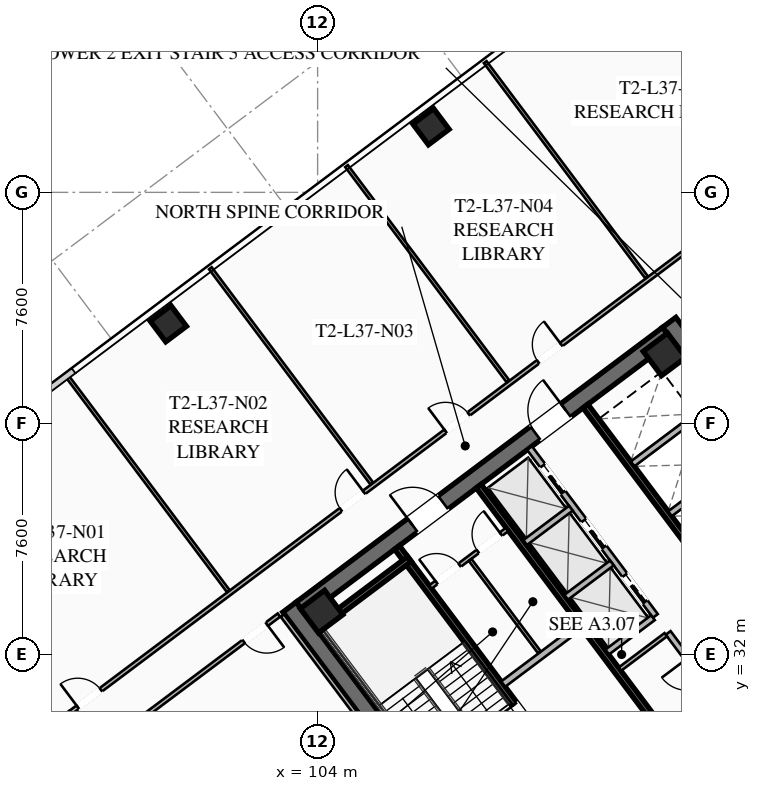
"""IFC4 building model, lengths in metres.
Left out: names, types, materials, properties, quantities, classifications, styles, units other than length and angle.
Written with IfcOpenShell. Run it as: python <this file> out.ifc"""

import sys

from ifc_helpers import new_model, si_unit, direction, frame, frame_2d, origin, origin_2d, place, context, subcontext, project, spatial, rectangle, hollow_rectangle, extrude, element, fill, save


model = new_model("IFC4")
c1 = context("Model", 3, precision=1e-05, world=origin(), true_north=direction((0.0, 1.0)))
c2 = subcontext(c1, "Body", "Model", "MODEL_VIEW")
j1 = project(units=[si_unit("LENGTHUNIT", "METRE"), si_unit("PLANEANGLEUNIT", "RADIAN")], contexts=[c1])
p1 = place(None, origin())
s1 = spatial("IfcSite", under=j1, at=p1, CompositionType="ELEMENT")
p2 = place(p1, origin())
s2 = spatial("IfcBuilding", under=s1, at=p2, CompositionType="ELEMENT")
p3 = place(p2, frame((0.0, 0.0, 139.25)))
s3 = spatial("IfcBuildingStorey", under=s2, at=p3, CompositionType="ELEMENT", Elevation=139.25)
for number, where, z_axis, x_axis in (
    (1, (112.436, 21.077, 0.0), (0.0, 0.0, 1.0), (-0.6, 0.8, 0.0)),
    (2, (115.564, 42.923, 0.0), (0.0, 0.0, 1.0), (0.6, -0.8, 0.0)),
):
    element("IfcWall", number, at=place(p3, frame(where, z_axis=z_axis, x_axis=x_axis)), inside=s3, PredefinedType="SHEAR", context=c2, shape_type="SweptSolid", body=[
        extrude(rectangle(XDim=15.6, YDim=0.55, at=frame_2d((7.8, 0.0))), origin(), (0.0, 0.0, 1.0), 3.55),
    ])
p4 = place(p3, frame((124.539, 30.498, 0.0), z_axis=(0.0, 0.0, 1.0), x_axis=(-0.799998054672, -0.600002593761, 0.0)))
e3 = element("IfcWall", 3, at=p4, inside=s3, PredefinedType="SHEAR", context=c2, shape_type="SweptSolid", body=[
    extrude(rectangle(XDim=15.06, YDim=0.55, at=frame_2d((7.53, 0.0))), origin(), (0.0, 0.0, 1.0), 3.55),
])
p5 = place(p4, frame((9.23, 0.0, 0.0)))
e4 = element("IfcOpeningElement", 4, at=p5, cuts=e3, PredefinedType="OPENING", context=c2, shape_type="SweptSolid", body=[
    extrude(rectangle(XDim=1.25, YDim=2.25, at=frame_2d((0.625, 1.125))), frame((0.0, 0.285, 0.0), z_axis=(0.0, -1.0, 0.0), x_axis=(1.0, 0.0, 0.0)), (0.0, 0.0, 1.0), 0.57),
])
p6 = place(p4, frame((4.18, 0.0, 0.0)))
e5 = element("IfcOpeningElement", 5, at=p6, cuts=e3, PredefinedType="OPENING", context=c2, shape_type="SweptSolid", body=[
    extrude(rectangle(XDim=1.25, YDim=2.25, at=frame_2d((0.625, 1.125))), frame((0.0, 0.285, 0.0), z_axis=(0.0, -1.0, 0.0), x_axis=(1.0, 0.0, 0.0)), (0.0, 0.0, 1.0), 0.57),
])
p7 = place(p3, frame((103.461, 33.502, 0.0), z_axis=(0.0, 0.0, 1.0), x_axis=(0.799998054672, 0.600002593761, 0.0)))
e6 = element("IfcWall", 6, at=p7, inside=s3, PredefinedType="SHEAR", context=c2, shape_type="SweptSolid", body=[
    extrude(rectangle(XDim=15.06, YDim=0.55, at=frame_2d((7.53, 0.0))), origin(), (0.0, 0.0, 1.0), 3.55),
])
p8 = place(p7, frame((4.58, 0.0, 0.0)))
e7 = element("IfcOpeningElement", 7, at=p8, cuts=e6, PredefinedType="OPENING", context=c2, shape_type="SweptSolid", body=[
    extrude(rectangle(XDim=1.25, YDim=2.25, at=frame_2d((0.625, 1.125))), frame((0.0, 0.285, 0.0), z_axis=(0.0, -1.0, 0.0), x_axis=(1.0, 0.0, 0.0)), (0.0, 0.0, 1.0), 0.57),
])
p9 = place(p7, frame((9.63, 0.0, 0.0)))
e8 = element("IfcOpeningElement", 8, at=p9, cuts=e6, PredefinedType="OPENING", context=c2, shape_type="SweptSolid", body=[
    extrude(rectangle(XDim=1.25, YDim=2.25, at=frame_2d((0.625, 1.125))), frame((0.0, 0.285, 0.0), z_axis=(0.0, -1.0, 0.0), x_axis=(1.0, 0.0, 0.0)), (0.0, 0.0, 1.0), 0.57),
])
for number, where, z_axis, x_axis in (
    (9, (115.41, 41.87, 0.0), (0.0, 0.0, 1.0), (0.8, 0.6, 0.0)),
    (10, (104.13, 33.41, 0.0), (0.0, 0.0, 1.0), (0.8, 0.6, 0.0)),
):
    element("IfcColumn", number, at=place(p3, frame(where, z_axis=z_axis, x_axis=x_axis)), inside=s3, PredefinedType="COLUMN", context=c2, shape_type="SweptSolid", body=[
        extrude(hollow_rectangle(XDim=1.0, YDim=1.0, WallThickness=0.04, at=origin_2d()), origin(), (0.0, 0.0, 1.0), 3.37),
    ])
for number, where, z_axis, x_axis in (
    (11, (107.73, 49.36, 0.0), (0.0, 0.0, 1.0), (0.8, 0.6, 0.0)),
    (12, (99.09, 42.88, 0.0), (0.0, 0.0, 1.0), (0.8, 0.6, 0.0)),
):
    element("IfcColumn", number, at=place(p3, frame(where, z_axis=z_axis, x_axis=x_axis)), inside=s3, PredefinedType="COLUMN", context=c2, shape_type="SweptSolid", body=[
        extrude(hollow_rectangle(XDim=0.85, YDim=0.85, WallThickness=0.035, at=origin_2d()), origin(), (0.0, 0.0, 1.0), 3.37),
    ])
p10 = place(p3, frame((111.44, 29.08, 0.0), z_axis=(0.0, 0.0, 1.0), x_axis=(-0.59999029481, 0.8000072788, 0.0)))
e13 = element("IfcWall", 13, at=p10, inside=s3, PredefinedType="SHEAR", context=c2, shape_type="SweptSolid", body=[
    extrude(rectangle(XDim=8.05, YDim=0.2, at=frame_2d((4.025, 0.0))), origin(), (0.0, 0.0, 1.0), 3.37),
])
p11 = place(p10, frame((0.45, 0.0, 0.0)))
e14 = element("IfcOpeningElement", 14, at=p11, cuts=e13, PredefinedType="OPENING", context=c2, shape_type="SweptSolid", body=[
    extrude(rectangle(XDim=1.15, YDim=2.2, at=frame_2d((0.575, 1.1))), frame((0.0, 0.11, 0.0), z_axis=(0.0, -1.0, 0.0), x_axis=(1.0, 0.0, 0.0)), (0.0, 0.0, 1.0), 0.22),
])
p12 = place(p3, frame((103.956, 32.842, 0.0), z_axis=(0.0, 0.0, 1.0), x_axis=(0.800015298837, 0.599979601008, 0.0)))
e15 = element("IfcWall", 15, at=p12, inside=s3, PredefinedType="SHEAR", context=c2, shape_type="SweptSolid", body=[
    extrude(rectangle(XDim=3.83, YDim=0.2, at=frame_2d((1.915, 0.0))), origin(), (0.0, 0.0, 1.0), 3.37),
])
p13 = place(p3, frame((117.998, 25.936, 0.0), z_axis=(0.0, 0.0, 1.0), x_axis=(-0.600002693989, 0.799997979501, 0.0)))
e16 = element("IfcWall", 16, at=p13, inside=s3, PredefinedType="SHEAR", context=c2, shape_type="SweptSolid", body=[
    extrude(rectangle(XDim=14.5, YDim=0.2, at=frame_2d((7.25, 0.0))), origin(), (0.0, 0.0, 1.0), 3.37),
])
p14 = place(p3, frame((110.104, 31.028, 0.0), z_axis=(0.0, 0.0, 1.0), x_axis=(0.800018601094, 0.59997519774, 0.0)))
e17 = element("IfcWall", 17, at=p14, inside=s3, PredefinedType="SOLIDWALL", context=c2, shape_type="SweptSolid", body=[
    extrude(rectangle(XDim=3.15, YDim=0.22, at=frame_2d((1.575, 0.0))), origin(), (0.0, 0.0, 1.0), 2.723),
])
p15 = place(p3, frame((112.81, 40.17, 0.0), z_axis=(0.0, 0.0, 1.0), x_axis=(0.599993943644, -0.800004542231, 0.0)))
e18 = element("IfcWall", 18, at=p15, inside=s3, PredefinedType="SHEAR", context=c2, shape_type="SweptSolid", body=[
    extrude(rectangle(XDim=6.45, YDim=0.2, at=frame_2d((3.225, 0.0))), origin(), (0.0, 0.0, 1.0), 3.37),
])
for number, where, z_axis, x_axis in (
    (19, (115.59, 36.63, 0.0), (0.0, 0.0, 1.0), (0.8, 0.6, 0.0)),
    (20, (114.36, 38.27, 0.0), (0.0, 0.0, 1.0), (0.8, 0.6, 0.0)),
):
    element("IfcWall", number, at=place(p3, frame(where, z_axis=z_axis, x_axis=x_axis)), inside=s3, PredefinedType="SOLIDWALL", context=c2, shape_type="SweptSolid", body=[
        extrude(rectangle(XDim=3.48, YDim=0.2, at=frame_2d((1.74, 0.0))), origin(), (0.0, 0.0, 1.0), 3.37),
    ])
p16 = place(p3, frame((107.71, 34.22, 0.0), z_axis=(0.0, 0.0, 1.0), x_axis=(0.799981399002, 0.60002480053, 0.0)))
e21 = element("IfcWall", 21, at=p16, inside=s3, PredefinedType="PARTITIONING", context=c2, shape_type="SweptSolid", body=[
    extrude(rectangle(XDim=3.15, YDim=0.135, at=frame_2d((1.575, 0.0))), origin(), (0.0, 0.0, 1.0), 2.723),
])
p17 = place(p16, frame((0.25, 0.0, 0.0)))
e22 = element("IfcOpeningElement", 22, at=p17, cuts=e21, PredefinedType="OPENING", context=c2, shape_type="SweptSolid", body=[
    extrude(rectangle(XDim=0.95, YDim=2.05, at=frame_2d((0.475, 1.025))), frame((0.0, 0.077, 0.0), z_axis=(0.0, -1.0, 0.0), x_axis=(1.0, 0.0, 0.0)), (0.0, 0.0, 1.0), 0.155),
])
p18 = place(p16, frame((1.95, 0.0, 0.0)))
e23 = element("IfcOpeningElement", 23, at=p18, cuts=e21, PredefinedType="OPENING", context=c2, shape_type="SweptSolid", body=[
    extrude(rectangle(XDim=0.95, YDim=2.05, at=frame_2d((0.475, 1.025))), frame((0.0, 0.077, 0.0), z_axis=(0.0, -1.0, 0.0), x_axis=(1.0, 0.0, 0.0)), (0.0, 0.0, 1.0), 0.155),
])
p19 = place(p3, frame((111.296, 32.072, 0.0), z_axis=(0.0, 0.0, 1.0), x_axis=(-0.59995887973, 0.800030838552, 0.0)))
e24 = element("IfcWall", 24, at=p19, inside=s3, PredefinedType="PARTITIONING", context=c2, shape_type="SweptSolid", body=[
    extrude(rectangle(XDim=3.8, YDim=0.11, at=frame_2d((1.9, 0.0))), origin(), (0.0, 0.0, 1.0), 2.723),
])
p20 = place(p3, frame((119.67, 27.19, 0.0), z_axis=(0.0, 0.0, 1.0), x_axis=(-0.599988677396, 0.800008491828, 0.0)))
e25 = element("IfcWall", 25, at=p20, inside=s3, PredefinedType="SOLIDWALL", context=c2, shape_type="SweptSolid", body=[
    extrude(rectangle(XDim=6.9, YDim=0.2, at=frame_2d((3.45, 0.0))), origin(), (0.0, 0.0, 1.0), 2.723),
])
p21 = place(p20, frame((0.85, 0.0, 0.0)))
e26 = element("IfcOpeningElement", 26, at=p21, cuts=e25, PredefinedType="OPENING", context=c2, shape_type="SweptSolid", body=[
    extrude(rectangle(XDim=0.95, YDim=2.05, at=frame_2d((0.475, 1.025))), frame((0.0, 0.11, 0.0), z_axis=(0.0, -1.0, 0.0), x_axis=(1.0, 0.0, 0.0)), (0.0, 0.0, 1.0), 0.22),
])
p22 = place(p20, frame((4.8, 0.0, 0.0)))
e27 = element("IfcOpeningElement", 27, at=p22, cuts=e25, PredefinedType="OPENING", context=c2, shape_type="SweptSolid", body=[
    extrude(rectangle(XDim=1.05, YDim=2.2, at=frame_2d((0.525, 1.1))), frame((0.0, 0.11, 0.0), z_axis=(0.0, -1.0, 0.0), x_axis=(1.0, 0.0, 0.0)), (0.0, 0.0, 1.0), 0.22),
])
p23 = place(p3, frame((113.946, 31.522, 0.0), z_axis=(0.0, 0.0, 1.0), x_axis=(0.8, 0.6, 0.0)))
e28 = element("IfcWall", 28, at=p23, inside=s3, PredefinedType="PARTITIONING", context=c2, shape_type="SweptSolid", body=[
    extrude(rectangle(XDim=1.88, YDim=0.135, at=frame_2d((0.94, 0.0))), origin(), (0.0, 0.0, 1.0), 2.723),
])
p24 = place(p3, frame((115.11, 33.27, 0.0), z_axis=(0.0, 0.0, 1.0), x_axis=(-0.600011322243, 0.799991508192, 0.0)))
e29 = element("IfcWall", 29, at=p24, inside=s3, PredefinedType="SOLIDWALL", context=c2, shape_type="SweptSolid", body=[
    extrude(rectangle(XDim=6.9, YDim=0.2, at=frame_2d((3.45, 0.0))), origin(), (0.0, 0.0, 1.0), 3.37),
])
p25 = place(p24, frame((0.575, 0.0, 0.0)))
e30 = element("IfcOpeningElement", 30, at=p25, cuts=e29, PredefinedType="OPENING", context=c2, shape_type="SweptSolid", body=[
    extrude(rectangle(XDim=1.1, YDim=2.2, at=frame_2d((0.55, 1.1))), frame((0.0, 0.11, 0.0), z_axis=(0.0, -1.0, 0.0), x_axis=(1.0, 0.0, 0.0)), (0.0, 0.0, 1.0), 0.22),
])
p26 = place(p24, frame((2.825, 0.0, 0.0)))
e31 = element("IfcOpeningElement", 31, at=p26, cuts=e29, PredefinedType="OPENING", context=c2, shape_type="SweptSolid", body=[
    extrude(rectangle(XDim=1.1, YDim=2.2, at=frame_2d((0.55, 1.1))), frame((0.0, 0.11, 0.0), z_axis=(0.0, -1.0, 0.0), x_axis=(1.0, 0.0, 0.0)), (0.0, 0.0, 1.0), 0.22),
])
p27 = place(p24, frame((5.075, 0.0, 0.0)))
e32 = element("IfcOpeningElement", 32, at=p27, cuts=e29, PredefinedType="OPENING", context=c2, shape_type="SweptSolid", body=[
    extrude(rectangle(XDim=1.1, YDim=2.2, at=frame_2d((0.55, 1.1))), frame((0.0, 0.11, 0.0), z_axis=(0.0, -1.0, 0.0), x_axis=(1.0, 0.0, 0.0)), (0.0, 0.0, 1.0), 0.22),
])
p28 = place(p3, frame((113.526, 32.082, 0.0), z_axis=(0.0, 0.0, 1.0), x_axis=(0.800046745961, 0.599937666993, 0.0)))
e33 = element("IfcWall", 33, at=p28, inside=s3, PredefinedType="SOLIDWALL", context=c2, shape_type="SweptSolid", body=[
    extrude(rectangle(XDim=1.88, YDim=0.2, at=frame_2d((0.94, 0.0))), origin(), (0.0, 0.0, 1.0), 3.37),
])
p29 = place(p3, frame((112.176, 33.882, 0.0), z_axis=(0.0, 0.0, 1.0), x_axis=(0.8, 0.6, 0.0)))
e34 = element("IfcWall", 34, at=p29, inside=s3, PredefinedType="SOLIDWALL", context=c2, shape_type="SweptSolid", body=[
    extrude(rectangle(XDim=1.88, YDim=0.2, at=frame_2d((0.94, 0.0))), origin(), (0.0, 0.0, 1.0), 3.37),
])
p30 = place(p3, frame((110.826, 35.682, 0.0), z_axis=(0.0, 0.0, 1.0), x_axis=(0.799984418148, 0.600020775241, 0.0)))
e35 = element("IfcWall", 35, at=p30, inside=s3, PredefinedType="SOLIDWALL", context=c2, shape_type="SweptSolid", body=[
    extrude(rectangle(XDim=1.88, YDim=0.2, at=frame_2d((0.94, 0.0))), origin(), (0.0, 0.0, 1.0), 3.37),
])
p31 = place(p3, frame((95.87, 30.09, 0.0), z_axis=(0.0, 0.0, 1.0), x_axis=(0.799997191971, 0.600003744021, 0.0)))
e36 = element("IfcWall", 36, at=p31, inside=s3, PredefinedType="PARTITIONING", context=c2, shape_type="SweptSolid", body=[
    extrude(rectangle(XDim=31.3, YDim=0.135, at=frame_2d((15.65, 0.0))), origin(), (0.0, 0.0, 1.0), 2.723),
])
p32 = place(p31, frame((0.3, 0.0, 0.0)))
e37 = element("IfcOpeningElement", 37, at=p32, cuts=e36, PredefinedType="OPENING", context=c2, shape_type="SweptSolid", body=[
    extrude(rectangle(XDim=0.95, YDim=2.05, at=frame_2d((0.475, 1.025))), frame((0.0, 0.077, 0.0), z_axis=(0.0, -1.0, 0.0), x_axis=(1.0, 0.0, 0.0)), (0.0, 0.0, 1.0), 0.155),
])
p33 = place(p31, frame((11.12, 0.0, 0.0)))
e38 = element("IfcOpeningElement", 38, at=p33, cuts=e36, PredefinedType="OPENING", context=c2, shape_type="SweptSolid", body=[
    extrude(rectangle(XDim=0.95, YDim=2.05, at=frame_2d((0.475, 1.025))), frame((0.0, 0.077, 0.0), z_axis=(0.0, -1.0, 0.0), x_axis=(1.0, 0.0, 0.0)), (0.0, 0.0, 1.0), 0.155),
])
p34 = place(p31, frame((15.423, 0.0, 0.0)))
e39 = element("IfcOpeningElement", 39, at=p34, cuts=e36, PredefinedType="OPENING", context=c2, shape_type="SweptSolid", body=[
    extrude(rectangle(XDim=0.95, YDim=2.05, at=frame_2d((0.475, 1.025))), frame((0.0, 0.077, 0.0), z_axis=(0.0, -1.0, 0.0), x_axis=(1.0, 0.0, 0.0)), (0.0, 0.0, 1.0), 0.155),
])
p35 = place(p31, frame((19.228, 0.0, 0.0)))
e40 = element("IfcOpeningElement", 40, at=p35, cuts=e36, PredefinedType="OPENING", context=c2, shape_type="SweptSolid", body=[
    extrude(rectangle(XDim=0.95, YDim=2.05, at=frame_2d((0.475, 1.025))), frame((0.0, 0.077, 0.0), z_axis=(0.0, -1.0, 0.0), x_axis=(1.0, 0.0, 0.0)), (0.0, 0.0, 1.0), 0.155),
])
p36 = place(p31, frame((30.05, 0.0, 0.0)))
e41 = element("IfcOpeningElement", 41, at=p36, cuts=e36, PredefinedType="OPENING", context=c2, shape_type="SweptSolid", body=[
    extrude(rectangle(XDim=0.95, YDim=2.05, at=frame_2d((0.475, 1.025))), frame((0.0, 0.077, 0.0), z_axis=(0.0, -1.0, 0.0), x_axis=(1.0, 0.0, 0.0)), (0.0, 0.0, 1.0), 0.155),
])
p37 = place(p3, frame((93.766, 28.512, 0.0), z_axis=(0.0, 0.0, 1.0), x_axis=(0.799977721118, 0.600029704027, 0.0)))
e42 = element("IfcWall", 42, at=p37, inside=s3, PredefinedType="PARTITIONING", context=c2, shape_type="SweptSolid", body=[
    extrude(rectangle(XDim=2.63, YDim=0.135, at=frame_2d((1.315, 0.0))), origin(), (0.0, 0.0, 1.0), 2.723),
])
for number, where, z_axis, x_axis in (
    (43, (101.062, 34.084, 0.0), (0.0, 0.0, 1.0), (-0.6, 0.8, 0.0)),
    (44, (105.782, 37.624, 0.0), (0.0, 0.0, 1.0), (-0.6, 0.8, 0.0)),
    (45, (110.262, 40.984, 0.0), (0.0, 0.0, 1.0), (-0.6, 0.8, 0.0)),
):
    element("IfcWall", number, at=place(p3, frame(where, z_axis=z_axis, x_axis=x_axis)), inside=s3, PredefinedType="PARTITIONING", context=c2, shape_type="SweptSolid", body=[
        extrude(rectangle(XDim=8.85, YDim=0.11, at=frame_2d((4.425, 0.0))), origin(), (0.0, 0.0, 1.0), 2.723),
    ])
p38 = place(p3, frame((114.822, 44.404, 0.0), z_axis=(0.0, 0.0, 1.0), x_axis=(-0.600013241589, 0.799990068637, 0.0)))
e46 = element("IfcWall", 46, at=p38, inside=s3, PredefinedType="PARTITIONING", context=c2, shape_type="SweptSolid", body=[
    extrude(rectangle(XDim=8.85, YDim=0.11, at=frame_2d((4.425, 0.0))), origin(), (0.0, 0.0, 1.0), 2.723),
])
p39 = place(p3, frame((132.352, 33.614, 0.0), z_axis=(0.0, 0.0, 1.0), x_axis=(-0.8, -0.6, 0.0)))
e47 = element("IfcWall", 47, at=p39, inside=s3, PredefinedType="PARTITIONING", context=c2, shape_type="SweptSolid", body=[
    extrude(rectangle(XDim=31.3, YDim=0.135, at=frame_2d((15.65, 0.0))), origin(), (0.0, 0.0, 1.0), 2.723),
])
p40 = place(p39, frame((29.97, 0.0, 0.0)))
e48 = element("IfcOpeningElement", 48, at=p40, cuts=e47, PredefinedType="OPENING", context=c2, shape_type="SweptSolid", body=[
    extrude(rectangle(XDim=0.95, YDim=2.05, at=frame_2d((0.475, 1.025))), frame((0.0, 0.077, 0.0), z_axis=(0.0, -1.0, 0.0), x_axis=(1.0, 0.0, 0.0)), (0.0, 0.0, 1.0), 0.155),
])
p41 = place(p39, frame((14.968, 0.0, 0.0)))
e49 = element("IfcOpeningElement", 49, at=p41, cuts=e47, PredefinedType="OPENING", context=c2, shape_type="SweptSolid", body=[
    extrude(rectangle(XDim=0.95, YDim=2.05, at=frame_2d((0.475, 1.025))), frame((0.0, 0.077, 0.0), z_axis=(0.0, -1.0, 0.0), x_axis=(1.0, 0.0, 0.0)), (0.0, 0.0, 1.0), 0.155),
])
p42 = place(p39, frame((0.38, 0.0, 0.0)))
e50 = element("IfcOpeningElement", 50, at=p42, cuts=e47, PredefinedType="OPENING", context=c2, shape_type="SweptSolid", body=[
    extrude(rectangle(XDim=0.95, YDim=2.05, at=frame_2d((0.475, 1.025))), frame((0.0, 0.077, 0.0), z_axis=(0.0, -1.0, 0.0), x_axis=(1.0, 0.0, 0.0)), (0.0, 0.0, 1.0), 0.155),
])
p43 = place(p3, frame((112.104, 20.928, 0.0), z_axis=(0.0, 0.0, 1.0), x_axis=(-0.599994940075, 0.800003794918, 0.0)))
e51 = element("IfcWall", 51, at=p43, inside=s3, PredefinedType="PARTITIONING", context=c2, shape_type="SweptSolid", body=[
    extrude(rectangle(XDim=15.44, YDim=0.135, at=frame_2d((7.72, 0.0))), origin(), (0.0, 0.0, 1.0), 2.723),
])
p44 = place(p3, frame((102.728, 33.296, 0.0), z_axis=(0.0, 0.0, 1.0), x_axis=(-0.800002918023, -0.599996109283, 0.0)))
e52 = element("IfcWall", 52, at=p44, inside=s3, PredefinedType="PARTITIONING", context=c2, shape_type="SweptSolid", body=[
    extrude(rectangle(XDim=10.04, YDim=0.135, at=frame_2d((5.02, 0.0))), origin(), (0.0, 0.0, 1.0), 2.723),
])
p45 = place(p44, frame((0.5, 0.0, 0.0)))
e53 = element("IfcOpeningElement", 53, at=p45, cuts=e52, PredefinedType="OPENING", context=c2, shape_type="SweptSolid", body=[
    extrude(rectangle(XDim=0.95, YDim=2.05, at=frame_2d((0.475, 1.025))), frame((0.0, 0.077, 0.0), z_axis=(0.0, -1.0, 0.0), x_axis=(1.0, 0.0, 0.0)), (0.0, 0.0, 1.0), 0.155),
])
p46 = place(p8, origin())
e54 = element("IfcDoor", 54, at=p46, inside=s3, OperationType="SINGLE_SWING_LEFT", PredefinedType="DOOR", context=c2, shape_type="SweptSolid", body=[
    extrude(rectangle(XDim=1.25, YDim=2.25, at=frame_2d((0.625, 1.125))), frame((0.0, 0.025, 0.0), z_axis=(0.0, -1.0, 0.0), x_axis=(1.0, 0.0, 0.0)), (0.0, 0.0, 1.0), 0.05),
])
fill(e7, e54)
p47 = place(p9, origin())
e55 = element("IfcDoor", 55, at=p47, inside=s3, OperationType="SINGLE_SWING_RIGHT", PredefinedType="DOOR", context=c2, shape_type="SweptSolid", body=[
    extrude(rectangle(XDim=1.25, YDim=2.25, at=frame_2d((0.625, 1.125))), frame((0.0, 0.025, 0.0), z_axis=(0.0, -1.0, 0.0), x_axis=(1.0, 0.0, 0.0)), (0.0, 0.0, 1.0), 0.05),
])
fill(e8, e55)
p48 = place(p11, origin())
e56 = element("IfcDoor", 56, at=p48, inside=s3, OperationType="SINGLE_SWING_RIGHT", PredefinedType="DOOR", context=c2, shape_type="SweptSolid", body=[
    extrude(rectangle(XDim=1.15, YDim=2.2, at=frame_2d((0.575, 1.1))), frame((0.0, 0.025, 0.0), z_axis=(0.0, -1.0, 0.0), x_axis=(1.0, 0.0, 0.0)), (0.0, 0.0, 1.0), 0.05),
])
fill(e14, e56)
p49 = place(p17, origin())
e57 = element("IfcDoor", 57, at=p49, inside=s3, OperationType="SINGLE_SWING_LEFT", PredefinedType="DOOR", context=c2, shape_type="SweptSolid", body=[
    extrude(rectangle(XDim=0.95, YDim=2.05, at=frame_2d((0.475, 1.025))), frame((0.0, 0.025, 0.0), z_axis=(0.0, -1.0, 0.0), x_axis=(1.0, 0.0, 0.0)), (0.0, 0.0, 1.0), 0.05),
])
fill(e22, e57)
p50 = place(p18, origin())
e58 = element("IfcDoor", 58, at=p50, inside=s3, OperationType="SINGLE_SWING_RIGHT", PredefinedType="DOOR", context=c2, shape_type="SweptSolid", body=[
    extrude(rectangle(XDim=0.95, YDim=2.05, at=frame_2d((0.475, 1.025))), frame((0.0, 0.025, 0.0), z_axis=(0.0, -1.0, 0.0), x_axis=(1.0, 0.0, 0.0)), (0.0, 0.0, 1.0), 0.05),
])
fill(e23, e58)
p51 = place(p32, origin())
e59 = element("IfcDoor", 59, at=p51, inside=s3, OperationType="SINGLE_SWING_LEFT", PredefinedType="DOOR", context=c2, shape_type="SweptSolid", body=[
    extrude(rectangle(XDim=0.95, YDim=2.05, at=frame_2d((0.475, 1.025))), frame((0.0, 0.025, 0.0), z_axis=(0.0, -1.0, 0.0), x_axis=(1.0, 0.0, 0.0)), (0.0, 0.0, 1.0), 0.05),
])
fill(e37, e59)
p52 = place(p33, origin())
e60 = element("IfcDoor", 60, at=p52, inside=s3, OperationType="SINGLE_SWING_RIGHT", PredefinedType="DOOR", context=c2, shape_type="SweptSolid", body=[
    extrude(rectangle(XDim=0.95, YDim=2.05, at=frame_2d((0.475, 1.025))), frame((0.0, 0.025, 0.0), z_axis=(0.0, -1.0, 0.0), x_axis=(1.0, 0.0, 0.0)), (0.0, 0.0, 1.0), 0.05),
])
fill(e38, e60)
p53 = place(p34, origin())
e61 = element("IfcDoor", 61, at=p53, inside=s3, OperationType="SINGLE_SWING_LEFT", PredefinedType="DOOR", context=c2, shape_type="SweptSolid", body=[
    extrude(rectangle(XDim=0.95, YDim=2.05, at=frame_2d((0.475, 1.025))), frame((0.0, 0.025, 0.0), z_axis=(0.0, -1.0, 0.0), x_axis=(1.0, 0.0, 0.0)), (0.0, 0.0, 1.0), 0.05),
])
fill(e39, e61)
p54 = place(p35, origin())
e62 = element("IfcDoor", 62, at=p54, inside=s3, OperationType="SINGLE_SWING_RIGHT", PredefinedType="DOOR", context=c2, shape_type="SweptSolid", body=[
    extrude(rectangle(XDim=0.95, YDim=2.05, at=frame_2d((0.475, 1.025))), frame((0.0, 0.025, 0.0), z_axis=(0.0, -1.0, 0.0), x_axis=(1.0, 0.0, 0.0)), (0.0, 0.0, 1.0), 0.05),
])
fill(e40, e62)
p55 = place(p45, origin())
e63 = element("IfcDoor", 63, at=p55, inside=s3, OperationType="SINGLE_SWING_LEFT", PredefinedType="DOOR", context=c2, shape_type="SweptSolid", body=[
    extrude(rectangle(XDim=0.95, YDim=2.05, at=frame_2d((0.475, 1.025))), frame((0.0, 0.025, 0.0), z_axis=(0.0, -1.0, 0.0), x_axis=(1.0, 0.0, 0.0)), (0.0, 0.0, 1.0), 0.05),
])
fill(e53, e63)
p56 = place(p25, origin())
e64 = element("IfcDoor", 64, at=p56, inside=s3, OperationType="SLIDING_TO_LEFT", PredefinedType="DOOR", context=c2, shape_type="SweptSolid", body=[
    extrude(rectangle(XDim=1.1, YDim=2.2, at=frame_2d((0.55, 1.1))), frame((0.0, 0.025, 0.0), z_axis=(0.0, -1.0, 0.0), x_axis=(1.0, 0.0, 0.0)), (0.0, 0.0, 1.0), 0.05),
])
fill(e30, e64)
p57 = place(p26, origin())
e65 = element("IfcDoor", 65, at=p57, inside=s3, OperationType="SLIDING_TO_LEFT", PredefinedType="DOOR", context=c2, shape_type="SweptSolid", body=[
    extrude(rectangle(XDim=1.1, YDim=2.2, at=frame_2d((0.55, 1.1))), frame((0.0, 0.025, 0.0), z_axis=(0.0, -1.0, 0.0), x_axis=(1.0, 0.0, 0.0)), (0.0, 0.0, 1.0), 0.05),
])
fill(e31, e65)
p58 = place(p27, origin())
e66 = element("IfcDoor", 66, at=p58, inside=s3, OperationType="SLIDING_TO_LEFT", PredefinedType="DOOR", context=c2, shape_type="SweptSolid", body=[
    extrude(rectangle(XDim=1.1, YDim=2.2, at=frame_2d((0.55, 1.1))), frame((0.0, 0.025, 0.0), z_axis=(0.0, -1.0, 0.0), x_axis=(1.0, 0.0, 0.0)), (0.0, 0.0, 1.0), 0.05),
])
fill(e32, e66)
save(model, sys.argv[1])
